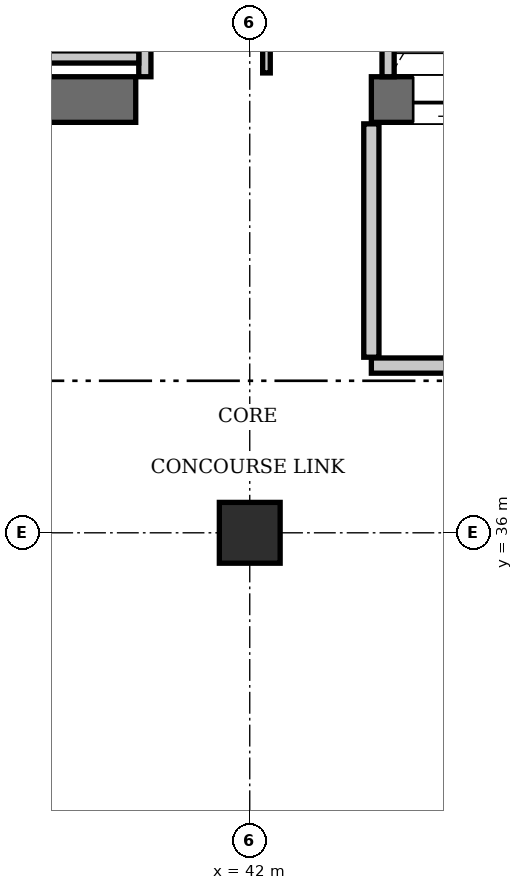
"""IFC4 building model, lengths in metres.
Left out: names, types, materials, properties, quantities, classifications, styles, units other than length and angle.
Written with IfcOpenShell. Run it as: python <this file> out.ifc"""

import sys

from ifc_helpers import new_model, si_unit, direction, frame, frame_2d, origin, origin_2d, place, context, subcontext, project, spatial, rectangle, extrude, element, fill, save


model = new_model("IFC4")
c1 = context("Model", 3, precision=1e-05, world=origin(), true_north=direction((0.0, 1.0)))
c2 = subcontext(c1, "Body", "Model", "MODEL_VIEW")
j1 = project(units=[si_unit("LENGTHUNIT", "METRE"), si_unit("PLANEANGLEUNIT", "RADIAN")], contexts=[c1])
p1 = place(None, origin())
s1 = spatial("IfcSite", under=j1, at=p1, CompositionType="ELEMENT")
p2 = place(p1, origin())
s2 = spatial("IfcBuilding", under=s1, at=p2, CompositionType="ELEMENT")
p3 = place(p2, frame((0.0, 0.0, 274.05)))
s3 = spatial("IfcBuildingStorey", under=s2, at=p3, CompositionType="ELEMENT", Elevation=274.05)
p4 = place(p3, frame((35.1, 41.7, 0.0), z_axis=(0.0, 0.0, 1.0), x_axis=(1.0, 0.0, 0.0)))
e1 = element("IfcWall", 1, at=p4, inside=s3, PredefinedType="SHEAR", context=c2, shape_type="SweptSolid", body=[
    extrude(rectangle(XDim=5.4, YDim=0.6, at=frame_2d((2.7, 0.0))), origin(), (0.0, 0.0, 1.0), 3.85),
])
p5 = place(p3, frame((43.6, 41.7, 0.0), z_axis=(0.0, 0.0, 1.0), x_axis=(1.0, 0.0, 0.0)))
e2 = element("IfcWall", 2, at=p5, inside=s3, PredefinedType="SHEAR", context=c2, shape_type="SweptSolid", body=[
    extrude(rectangle(XDim=6.8, YDim=0.6, at=frame_2d((3.4, 0.0))), origin(), (0.0, 0.0, 1.0), 3.85),
])
p6 = place(p5, frame((3.9, 0.0, 0.0)))
e3 = element("IfcOpeningElement", 3, at=p6, cuts=e2, PredefinedType="OPENING", context=c2, shape_type="SweptSolid", body=[
    extrude(rectangle(XDim=1.15, YDim=2.15, at=frame_2d((0.575, 1.075))), frame((0.0, 0.31, 0.0), z_axis=(0.0, -1.0, 0.0), x_axis=(1.0, 0.0, 0.0)), (0.0, 0.0, 1.0), 0.62),
])
p7 = place(p5, frame((0.55, 0.0, 0.0)))
e4 = element("IfcOpeningElement", 4, at=p7, cuts=e2, PredefinedType="OPENING", context=c2, shape_type="SweptSolid", body=[
    extrude(rectangle(XDim=1.1, YDim=2.2, at=frame_2d((0.55, 1.1))), frame((0.0, 0.31, 0.0), z_axis=(0.0, -1.0, 0.0), x_axis=(1.0, 0.0, 0.0)), (0.0, 0.0, 1.0), 0.62),
])
p8 = place(p3, frame((42.0, 36.0, 0.0), z_axis=(0.0, 0.0, 1.0), x_axis=(1.0, 0.0, 0.0)))
e5 = element("IfcColumn", 5, at=p8, inside=s3, PredefinedType="COLUMN", context=c2, shape_type="SweptSolid", body=[
    extrude(rectangle(XDim=0.8, YDim=0.8, at=origin_2d()), origin(), (0.0, 0.0, 1.0), 3.85),
])
p9 = place(p3, frame((43.82, 42.0, 0.0), z_axis=(0.0, 0.0, 1.0), x_axis=(0.0, 1.0, 0.0)))
e6 = element("IfcWall", 6, at=p9, inside=s3, PredefinedType="SOLIDWALL", context=c2, shape_type="SweptSolid", body=[
    extrude(rectangle(XDim=2.74, YDim=0.16, at=frame_2d((1.37, 0.0))), origin(), (0.0, 0.0, 1.0), 3.61),
])
p10 = place(p3, frame((40.62, 42.0, 0.0), z_axis=(0.0, 0.0, 1.0), x_axis=(0.0, 1.0, 0.0)))
e7 = element("IfcWall", 7, at=p10, inside=s3, PredefinedType="SOLIDWALL", context=c2, shape_type="SweptSolid", body=[
    extrude(rectangle(XDim=2.35, YDim=0.16, at=frame_2d((1.175, 0.0))), origin(), (0.0, 0.0, 1.0), 3.61),
])
p11 = place(p3, frame((35.52, 42.26, 0.0), z_axis=(0.0, 0.0, 1.0), x_axis=(1.0, 0.0, 0.0)))
e8 = element("IfcWall", 8, at=p11, inside=s3, PredefinedType="SOLIDWALL", context=c2, shape_type="SweptSolid", body=[
    extrude(rectangle(XDim=5.02, YDim=0.16, at=frame_2d((2.51, 0.0))), origin(), (0.0, 0.0, 1.0), 3.61),
])
p12 = place(p3, frame((43.6, 38.2, 0.0), z_axis=(0.0, 0.0, 1.0), x_axis=(1.0, 0.0, 0.0)))
e9 = element("IfcWall", 9, at=p12, inside=s3, PredefinedType="PARTITIONING", context=c2, shape_type="SweptSolid", body=[
    extrude(rectangle(XDim=5.8, YDim=0.2, at=frame_2d((2.9, 0.0))), origin(), (0.0, 0.0, 1.0), 3.61),
])
p13 = place(p12, frame((2.3, 0.0, 0.0)))
e10 = element("IfcOpeningElement", 10, at=p13, cuts=e9, PredefinedType="OPENING", context=c2, shape_type="SweptSolid", body=[
    extrude(rectangle(XDim=1.15, YDim=2.15, at=frame_2d((0.575, 1.075))), frame((0.0, 0.11, 0.0), z_axis=(0.0, -1.0, 0.0), x_axis=(1.0, 0.0, 0.0)), (0.0, 0.0, 1.0), 0.22),
])
p14 = place(p3, frame((43.6, 38.31, 0.0), z_axis=(0.0, 0.0, 1.0), x_axis=(0.0, 1.0, 0.0)))
e11 = element("IfcWall", 11, at=p14, inside=s3, PredefinedType="PARTITIONING", context=c2, shape_type="SweptSolid", body=[
    extrude(rectangle(XDim=3.07, YDim=0.2, at=frame_2d((1.535, 0.0))), origin(), (0.0, 0.0, 1.0), 3.61),
])
p15 = place(p3, frame((42.22, 42.05, 0.0), z_axis=(0.0, 0.0, 1.0), x_axis=(0.0, 1.0, 0.0)))
e12 = element("IfcWall", 12, at=p15, inside=s3, PredefinedType="PARTITIONING", context=c2, shape_type="SweptSolid", body=[
    extrude(rectangle(XDim=2.91, YDim=0.1, at=frame_2d((1.455, 0.0))), origin(), (0.0, 0.0, 1.0), 3.61),
])
p16 = place(p15, frame((0.65, 0.0, 0.0)))
e13 = element("IfcOpeningElement", 13, at=p16, cuts=e12, PredefinedType="OPENING", context=c2, shape_type="SweptSolid", body=[
    extrude(rectangle(XDim=0.8, YDim=2.05, at=frame_2d((0.4, 1.025))), frame((0.0, 0.06, 0.0), z_axis=(0.0, -1.0, 0.0), x_axis=(1.0, 0.0, 0.0)), (0.0, 0.0, 1.0), 0.12),
])
p17 = place(p7, frame((1.1, 0.0, 0.0), z_axis=(0.0, 0.0, 1.0), x_axis=(-1.0, 0.0, 0.0)))
e14 = element("IfcDoor", 14, at=p17, inside=s3, OperationType="SLIDING_TO_LEFT", PredefinedType="DOOR", context=c2, shape_type="SweptSolid", body=[
    extrude(rectangle(XDim=1.1, YDim=2.2, at=frame_2d((0.55, 1.1))), frame((0.0, 0.025, 0.0), z_axis=(0.0, -1.0, 0.0), x_axis=(1.0, 0.0, 0.0)), (0.0, 0.0, 1.0), 0.05),
])
fill(e4, e14)
save(model, sys.argv[1])
